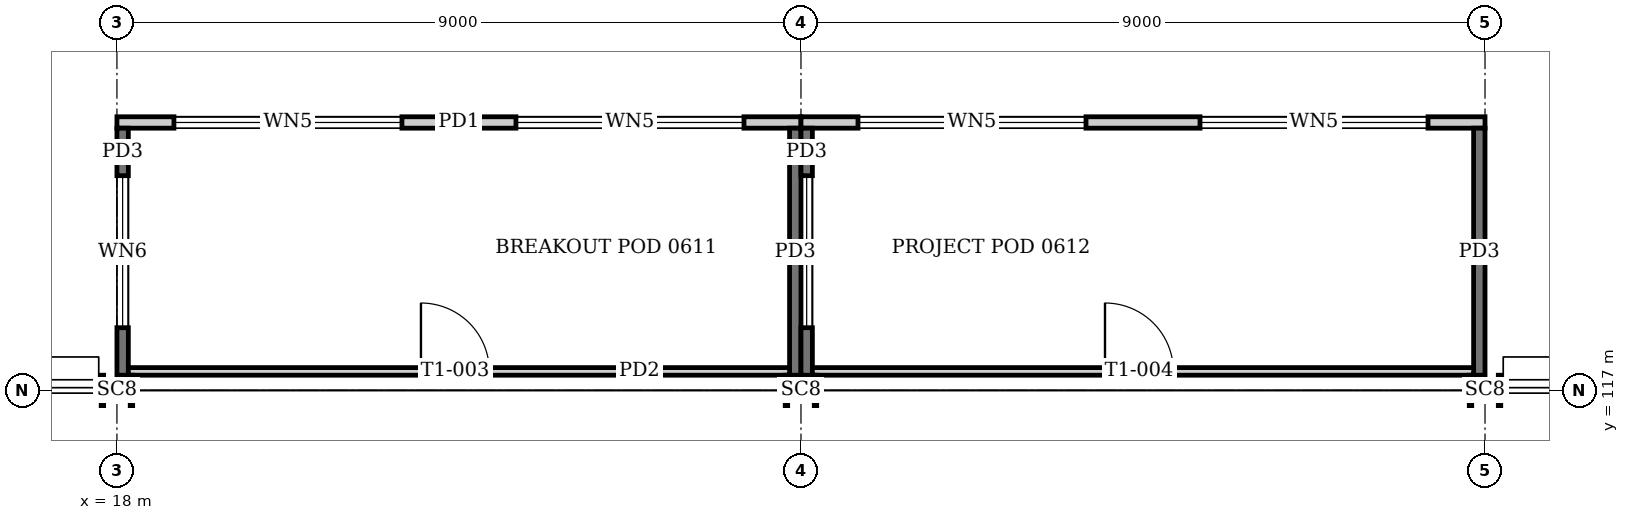
"""IFC4 building model, lengths in metres.
Left out: names, types, materials, properties, quantities, classifications, styles, units other than length and angle.
Written with IfcOpenShell. Run it as: python <this file> out.ifc"""

import sys

from ifc_helpers import new_model, si_unit, direction, frame, frame_2d, origin, origin_2d, place, context, subcontext, project, spatial, rectangle, i_section, extrude, element, fill, save


model = new_model("IFC4")
c1 = context("Model", 3, precision=1e-05, world=origin(), true_north=direction((0.0, 1.0)))
c2 = subcontext(c1, "Body", "Model", "MODEL_VIEW")
j1 = project(units=[si_unit("LENGTHUNIT", "METRE"), si_unit("PLANEANGLEUNIT", "RADIAN")], contexts=[c1])
p1 = place(None, origin())
s1 = spatial("IfcSite", under=j1, at=p1, CompositionType="ELEMENT")
p2 = place(p1, origin())
s2 = spatial("IfcBuilding", under=s1, at=p2, CompositionType="ELEMENT")
p3 = place(p2, frame((0.0, 0.0, 27.2)))
s3 = spatial("IfcBuildingStorey", under=s2, at=p3, CompositionType="ELEMENT", Elevation=27.2)
for number, where, z_axis, x_axis in (
    (1, (18.0, 117.0, 0.0), (0.0, 0.0, 1.0), (0.0, 1.0, 0.0)),
    (2, (27.0, 117.0, 0.0), (0.0, 0.0, 1.0), (0.0, 1.0, 0.0)),
    (3, (36.0, 117.0, 0.0), (0.0, 0.0, 1.0), (0.0, 1.0, 0.0)),
):
    element("IfcColumn", number, at=place(p3, frame(where, z_axis=z_axis, x_axis=x_axis)), inside=s3, PredefinedType="COLUMN", context=c2, shape_type="SweptSolid", body=[
        extrude(i_section(OverallWidth=0.4, OverallDepth=0.414, WebThickness=0.025, FlangeThickness=0.032, at=origin_2d()), origin(), (0.0, 0.0, 1.0), 4.0),
    ])
p4 = place(p3, frame((18.0, 120.525, 0.0), z_axis=(0.0, 0.0, 1.0), x_axis=(1.0, 0.0, 0.0)))
e4 = element("IfcWall", 4, at=p4, inside=s3, PredefinedType="SOLIDWALL", context=c2, shape_type="SweptSolid", body=[
    extrude(rectangle(XDim=9.0, YDim=0.15, at=frame_2d((4.5, 0.0))), origin(), (0.0, 0.0, 1.0), 2.6),
])
p5 = place(p4, frame((0.75, 0.0, 0.9)))
e5 = element("IfcOpeningElement", 5, at=p5, cuts=e4, PredefinedType="OPENING", context=c2, shape_type="SweptSolid", body=[
    extrude(rectangle(XDim=3.0, YDim=1.4, at=frame_2d((1.5, 0.7))), frame((0.0, 0.085, 0.0), z_axis=(0.0, -1.0, 0.0), x_axis=(1.0, 0.0, 0.0)), (0.0, 0.0, 1.0), 0.17),
])
p6 = place(p4, frame((5.25, 0.0, 0.9)))
e6 = element("IfcOpeningElement", 6, at=p6, cuts=e4, PredefinedType="OPENING", context=c2, shape_type="SweptSolid", body=[
    extrude(rectangle(XDim=3.0, YDim=1.4, at=frame_2d((1.5, 0.7))), frame((0.0, 0.085, 0.0), z_axis=(0.0, -1.0, 0.0), x_axis=(1.0, 0.0, 0.0)), (0.0, 0.0, 1.0), 0.17),
])
p7 = place(p3, frame((18.075, 120.45, -0.15), z_axis=(0.0, 0.0, 1.0), x_axis=(0.0, -1.0, 0.0)))
e7 = element("IfcWall", 7, at=p7, inside=s3, PredefinedType="SOLIDWALL", context=c2, shape_type="SweptSolid", body=[
    extrude(rectangle(XDim=3.25, YDim=0.15, at=frame_2d((1.625, 0.0))), origin(), (0.0, 0.0, 1.0), 2.75),
])
p8 = place(p7, frame((0.625, 0.0, 1.05)))
e8 = element("IfcOpeningElement", 8, at=p8, cuts=e7, PredefinedType="OPENING", context=c2, shape_type="SweptSolid", body=[
    extrude(rectangle(XDim=2.0, YDim=1.4, at=frame_2d((1.0, 0.7))), frame((0.0, 0.085, 0.0), z_axis=(0.0, -1.0, 0.0), x_axis=(1.0, 0.0, 0.0)), (0.0, 0.0, 1.0), 0.17),
])
p9 = place(p3, frame((26.925, 120.45, -0.15), z_axis=(0.0, 0.0, 1.0), x_axis=(0.0, -1.0, 0.0)))
e9 = element("IfcWall", 9, at=p9, inside=s3, PredefinedType="SOLIDWALL", context=c2, shape_type="SweptSolid", body=[
    extrude(rectangle(XDim=3.25, YDim=0.15, at=frame_2d((1.625, 0.0))), origin(), (0.0, 0.0, 1.0), 2.75),
])
p10 = place(p3, frame((18.15, 117.25, 0.0), z_axis=(0.0, 0.0, 1.0), x_axis=(1.0, 0.0, 0.0)))
e10 = element("IfcWall", 10, at=p10, inside=s3, PredefinedType="PARTITIONING", context=c2, shape_type="SweptSolid", body=[
    extrude(rectangle(XDim=8.7, YDim=0.1, at=frame_2d((4.35, 0.0))), origin(), (0.0, 0.0, 1.0), 2.6),
])
p11 = place(p10, frame((3.85, 0.0, 0.0)))
e11 = element("IfcOpeningElement", 11, at=p11, cuts=e10, PredefinedType="OPENING", context=c2, shape_type="SweptSolid", body=[
    extrude(rectangle(XDim=0.9, YDim=2.1, at=frame_2d((0.45, 1.05))), frame((0.0, 0.06, 0.0), z_axis=(0.0, -1.0, 0.0), x_axis=(1.0, 0.0, 0.0)), (0.0, 0.0, 1.0), 0.12),
])
p12 = place(p3, frame((27.0, 120.525, 0.0), z_axis=(0.0, 0.0, 1.0), x_axis=(1.0, 0.0, 0.0)))
e12 = element("IfcWall", 12, at=p12, inside=s3, PredefinedType="SOLIDWALL", context=c2, shape_type="SweptSolid", body=[
    extrude(rectangle(XDim=9.0, YDim=0.15, at=frame_2d((4.5, 0.0))), origin(), (0.0, 0.0, 1.0), 2.6),
])
p13 = place(p12, frame((0.75, 0.0, 0.9)))
e13 = element("IfcOpeningElement", 13, at=p13, cuts=e12, PredefinedType="OPENING", context=c2, shape_type="SweptSolid", body=[
    extrude(rectangle(XDim=3.0, YDim=1.4, at=frame_2d((1.5, 0.7))), frame((0.0, 0.085, 0.0), z_axis=(0.0, -1.0, 0.0), x_axis=(1.0, 0.0, 0.0)), (0.0, 0.0, 1.0), 0.17),
])
p14 = place(p12, frame((5.25, 0.0, 0.9)))
e14 = element("IfcOpeningElement", 14, at=p14, cuts=e12, PredefinedType="OPENING", context=c2, shape_type="SweptSolid", body=[
    extrude(rectangle(XDim=3.0, YDim=1.4, at=frame_2d((1.5, 0.7))), frame((0.0, 0.085, 0.0), z_axis=(0.0, -1.0, 0.0), x_axis=(1.0, 0.0, 0.0)), (0.0, 0.0, 1.0), 0.17),
])
p15 = place(p3, frame((27.075, 120.45, -0.15), z_axis=(0.0, 0.0, 1.0), x_axis=(0.0, -1.0, 0.0)))
e15 = element("IfcWall", 15, at=p15, inside=s3, PredefinedType="SOLIDWALL", context=c2, shape_type="SweptSolid", body=[
    extrude(rectangle(XDim=3.25, YDim=0.15, at=frame_2d((1.625, 0.0))), origin(), (0.0, 0.0, 1.0), 2.75),
])
p16 = place(p15, frame((0.625, 0.0, 1.05)))
e16 = element("IfcOpeningElement", 16, at=p16, cuts=e15, PredefinedType="OPENING", context=c2, shape_type="SweptSolid", body=[
    extrude(rectangle(XDim=2.0, YDim=1.4, at=frame_2d((1.0, 0.7))), frame((0.0, 0.085, 0.0), z_axis=(0.0, -1.0, 0.0), x_axis=(1.0, 0.0, 0.0)), (0.0, 0.0, 1.0), 0.17),
])
p17 = place(p3, frame((35.925, 120.45, -0.15), z_axis=(0.0, 0.0, 1.0), x_axis=(0.0, -1.0, 0.0)))
e17 = element("IfcWall", 17, at=p17, inside=s3, PredefinedType="SOLIDWALL", context=c2, shape_type="SweptSolid", body=[
    extrude(rectangle(XDim=3.25, YDim=0.15, at=frame_2d((1.625, 0.0))), origin(), (0.0, 0.0, 1.0), 2.75),
])
p18 = place(p3, frame((27.15, 117.25, 0.0), z_axis=(0.0, 0.0, 1.0), x_axis=(1.0, 0.0, 0.0)))
e18 = element("IfcWall", 18, at=p18, inside=s3, PredefinedType="PARTITIONING", context=c2, shape_type="SweptSolid", body=[
    extrude(rectangle(XDim=8.7, YDim=0.1, at=frame_2d((4.35, 0.0))), origin(), (0.0, 0.0, 1.0), 2.6),
])
p19 = place(p18, frame((3.85, 0.0, 0.0)))
e19 = element("IfcOpeningElement", 19, at=p19, cuts=e18, PredefinedType="OPENING", context=c2, shape_type="SweptSolid", body=[
    extrude(rectangle(XDim=0.9, YDim=2.1, at=frame_2d((0.45, 1.05))), frame((0.0, 0.06, 0.0), z_axis=(0.0, -1.0, 0.0), x_axis=(1.0, 0.0, 0.0)), (0.0, 0.0, 1.0), 0.12),
])
p20 = place(p5, origin())
e20 = element("IfcWindow", 20, at=p20, inside=s3, PartitioningType="SINGLE_PANEL", PredefinedType="WINDOW", context=c2, shape_type="SweptSolid", body=[
    extrude(rectangle(XDim=3.0, YDim=1.4, at=frame_2d((1.5, 0.7))), frame((0.0, 0.03, 0.0), z_axis=(0.0, -1.0, 0.0), x_axis=(1.0, 0.0, 0.0)), (0.0, 0.0, 1.0), 0.06),
])
fill(e5, e20)
p21 = place(p6, origin())
e21 = element("IfcWindow", 21, at=p21, inside=s3, PartitioningType="SINGLE_PANEL", PredefinedType="WINDOW", context=c2, shape_type="SweptSolid", body=[
    extrude(rectangle(XDim=3.0, YDim=1.4, at=frame_2d((1.5, 0.7))), frame((0.0, 0.03, 0.0), z_axis=(0.0, -1.0, 0.0), x_axis=(1.0, 0.0, 0.0)), (0.0, 0.0, 1.0), 0.06),
])
fill(e6, e21)
p22 = place(p8, origin())
e22 = element("IfcWindow", 22, at=p22, inside=s3, PartitioningType="SINGLE_PANEL", PredefinedType="WINDOW", context=c2, shape_type="SweptSolid", body=[
    extrude(rectangle(XDim=2.0, YDim=1.4, at=frame_2d((1.0, 0.7))), frame((0.0, 0.03, 0.0), z_axis=(0.0, -1.0, 0.0), x_axis=(1.0, 0.0, 0.0)), (0.0, 0.0, 1.0), 0.06),
])
fill(e8, e22)
p23 = place(p11, origin())
e23 = element("IfcDoor", 23, at=p23, inside=s3, OperationType="SINGLE_SWING_LEFT", PredefinedType="DOOR", context=c2, shape_type="SweptSolid", body=[
    extrude(rectangle(XDim=0.9, YDim=2.1, at=frame_2d((0.45, 1.05))), frame((0.0, 0.025, 0.0), z_axis=(0.0, -1.0, 0.0), x_axis=(1.0, 0.0, 0.0)), (0.0, 0.0, 1.0), 0.05),
])
fill(e11, e23)
p24 = place(p13, origin())
e24 = element("IfcWindow", 24, at=p24, inside=s3, PartitioningType="SINGLE_PANEL", PredefinedType="WINDOW", context=c2, shape_type="SweptSolid", body=[
    extrude(rectangle(XDim=3.0, YDim=1.4, at=frame_2d((1.5, 0.7))), frame((0.0, 0.03, 0.0), z_axis=(0.0, -1.0, 0.0), x_axis=(1.0, 0.0, 0.0)), (0.0, 0.0, 1.0), 0.06),
])
fill(e13, e24)
p25 = place(p14, origin())
e25 = element("IfcWindow", 25, at=p25, inside=s3, PartitioningType="SINGLE_PANEL", PredefinedType="WINDOW", context=c2, shape_type="SweptSolid", body=[
    extrude(rectangle(XDim=3.0, YDim=1.4, at=frame_2d((1.5, 0.7))), frame((0.0, 0.03, 0.0), z_axis=(0.0, -1.0, 0.0), x_axis=(1.0, 0.0, 0.0)), (0.0, 0.0, 1.0), 0.06),
])
fill(e14, e25)
p26 = place(p16, origin())
e26 = element("IfcWindow", 26, at=p26, inside=s3, PartitioningType="SINGLE_PANEL", PredefinedType="WINDOW", context=c2, shape_type="SweptSolid", body=[
    extrude(rectangle(XDim=2.0, YDim=1.4, at=frame_2d((1.0, 0.7))), frame((0.0, 0.03, 0.0), z_axis=(0.0, -1.0, 0.0), x_axis=(1.0, 0.0, 0.0)), (0.0, 0.0, 1.0), 0.06),
])
fill(e16, e26)
p27 = place(p19, origin())
e27 = element("IfcDoor", 27, at=p27, inside=s3, OperationType="SINGLE_SWING_LEFT", PredefinedType="DOOR", context=c2, shape_type="SweptSolid", body=[
    extrude(rectangle(XDim=0.9, YDim=2.1, at=frame_2d((0.45, 1.05))), frame((0.0, 0.025, 0.0), z_axis=(0.0, -1.0, 0.0), x_axis=(1.0, 0.0, 0.0)), (0.0, 0.0, 1.0), 0.05),
])
fill(e19, e27)
save(model, sys.argv[1])
